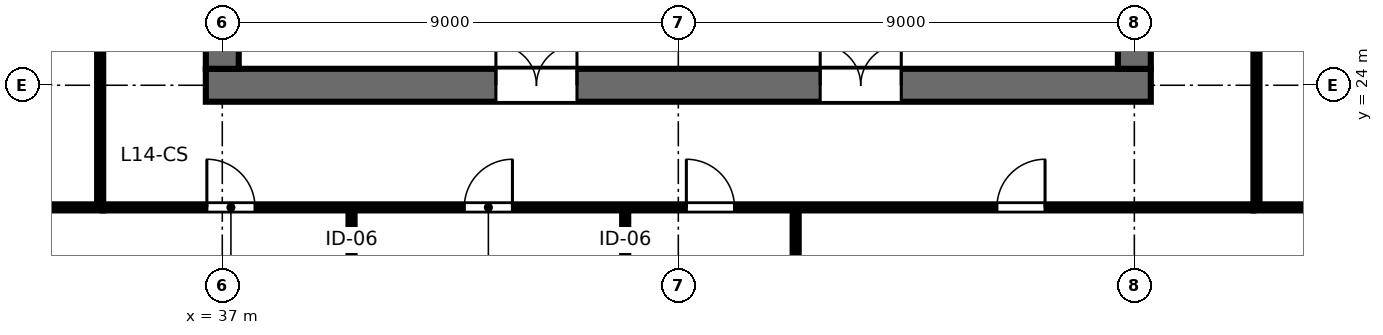
"""IFC4 building model, lengths in metres.
Left out: names, types, materials, properties, quantities, classifications, styles, units other than length and angle.
Written with IfcOpenShell. Run it as: python <this file> out.ifc"""

import sys

from ifc_helpers import new_model, si_unit, direction, frame, frame_2d, origin, place, context, subcontext, project, spatial, rectangle, extrude, element, fill, save


model = new_model("IFC4")
c1 = context("Model", 3, precision=1e-05, world=origin(), true_north=direction((0.0, 1.0)))
c2 = subcontext(c1, "Body", "Model", "MODEL_VIEW")
j1 = project(units=[si_unit("LENGTHUNIT", "METRE"), si_unit("PLANEANGLEUNIT", "RADIAN")], contexts=[c1])
p1 = place(None, origin())
s1 = spatial("IfcSite", under=j1, at=p1, CompositionType="ELEMENT")
p2 = place(p1, origin())
s2 = spatial("IfcBuilding", under=s1, at=p2, CompositionType="ELEMENT")
p3 = place(p2, frame((0.0, 0.0, 56.8)))
s3 = spatial("IfcBuildingStorey", under=s2, at=p3, CompositionType="ELEMENT", Elevation=56.8)
p4 = place(p3, frame((36.675, 24.0, 0.0), z_axis=(0.0, 0.0, 1.0), x_axis=(1.0, 0.0, 0.0)))
e1 = element("IfcWall", 1, at=p4, inside=s3, PredefinedType="SHEAR", context=c2, shape_type="SweptSolid", body=[
    extrude(rectangle(XDim=18.65, YDim=0.65, at=frame_2d((9.325, 0.0))), origin(), (0.0, 0.0, 1.0), 3.36),
])
p5 = place(p4, frame((5.725, 0.0, 0.0)))
e2 = element("IfcOpeningElement", 2, at=p5, cuts=e1, PredefinedType="OPENING", context=c2, shape_type="SweptSolid", body=[
    extrude(rectangle(XDim=1.6, YDim=2.15, at=frame_2d((0.8, 1.075))), frame((0.0, 0.335, 0.0), z_axis=(0.0, -1.0, 0.0), x_axis=(1.0, 0.0, 0.0)), (0.0, 0.0, 1.0), 0.67),
])
p6 = place(p4, frame((12.125, 0.0, 0.0)))
e3 = element("IfcOpeningElement", 3, at=p6, cuts=e1, PredefinedType="OPENING", context=c2, shape_type="SweptSolid", body=[
    extrude(rectangle(XDim=1.6, YDim=2.15, at=frame_2d((0.8, 1.075))), frame((0.0, 0.335, 0.0), z_axis=(0.0, -1.0, 0.0), x_axis=(1.0, 0.0, 0.0)), (0.0, 0.0, 1.0), 0.67),
])
p7 = place(p3, frame((37.0, 24.325, 0.0), z_axis=(0.0, 0.0, 1.0), x_axis=(0.0, 1.0, 0.0)))
e4 = element("IfcWall", 4, at=p7, inside=s3, PredefinedType="SHEAR", context=c2, shape_type="SweptSolid", body=[
    extrude(rectangle(XDim=15.35, YDim=0.65, at=frame_2d((7.675, 0.0))), origin(), (0.0, 0.0, 1.0), 3.36),
])
p8 = place(p7, frame((5.2, 0.0, 0.0)))
e5 = element("IfcOpeningElement", 5, at=p8, cuts=e4, PredefinedType="OPENING", context=c2, shape_type="SweptSolid", body=[
    extrude(rectangle(XDim=1.15, YDim=2.15, at=frame_2d((0.575, 1.075))), frame((0.0, 0.335, 0.0), z_axis=(0.0, -1.0, 0.0), x_axis=(1.0, 0.0, 0.0)), (0.0, 0.0, 1.0), 0.67),
])
p9 = place(p3, frame((55.0, 24.325, 0.0), z_axis=(0.0, 0.0, 1.0), x_axis=(0.0, 1.0, 0.0)))
e6 = element("IfcWall", 6, at=p9, inside=s3, PredefinedType="SHEAR", context=c2, shape_type="SweptSolid", body=[
    extrude(rectangle(XDim=15.35, YDim=0.65, at=frame_2d((7.675, 0.0))), origin(), (0.0, 0.0, 1.0), 3.36),
])
p10 = place(p9, frame((5.2, 0.0, 0.0)))
e7 = element("IfcOpeningElement", 7, at=p10, cuts=e6, PredefinedType="OPENING", context=c2, shape_type="SweptSolid", body=[
    extrude(rectangle(XDim=1.15, YDim=2.15, at=frame_2d((0.575, 1.075))), frame((0.0, 0.335, 0.0), z_axis=(0.0, -1.0, 0.0), x_axis=(1.0, 0.0, 0.0)), (0.0, 0.0, 1.0), 0.67),
])
p11 = place(p3, frame((39.551, 21.59, 0.0), z_axis=(0.0, 0.0, 1.0), x_axis=(0.0, -1.0, 0.0)))
e8 = element("IfcWall", 8, at=p11, inside=s3, PredefinedType="PARTITIONING", context=c2, shape_type="SweptSolid", body=[
    extrude(rectangle(XDim=10.81, YDim=0.12, at=frame_2d((5.405, 0.0))), origin(), (0.0, 0.0, 1.0), 2.64),
])
p12 = place(p11, frame((1.4, 0.0, 0.0)))
e9 = element("IfcOpeningElement", 9, at=p12, cuts=e8, PredefinedType="OPENING", context=c2, shape_type="SweptSolid", body=[
    extrude(rectangle(XDim=0.9, YDim=2.15, at=frame_2d((0.45, 1.075))), frame((0.0, 0.07, 0.0), z_axis=(0.0, -1.0, 0.0), x_axis=(1.0, 0.0, 0.0)), (0.0, 0.0, 1.0), 0.14),
])
p13 = place(p3, frame((44.952, 21.59, 0.0), z_axis=(0.0, 0.0, 1.0), x_axis=(0.0, -1.0, 0.0)))
e10 = element("IfcWall", 10, at=p13, inside=s3, PredefinedType="PARTITIONING", context=c2, shape_type="SweptSolid", body=[
    extrude(rectangle(XDim=10.81, YDim=0.12, at=frame_2d((5.405, 0.0))), origin(), (0.0, 0.0, 1.0), 2.64),
])
p14 = place(p13, frame((1.4, 0.0, 0.0)))
e11 = element("IfcOpeningElement", 11, at=p14, cuts=e10, PredefinedType="OPENING", context=c2, shape_type="SweptSolid", body=[
    extrude(rectangle(XDim=0.9, YDim=2.15, at=frame_2d((0.45, 1.075))), frame((0.0, 0.07, 0.0), z_axis=(0.0, -1.0, 0.0), x_axis=(1.0, 0.0, 0.0)), (0.0, 0.0, 1.0), 0.14),
])
p15 = place(p3, frame((48.316, 21.59, 0.0), z_axis=(0.0, 0.0, 1.0), x_axis=(0.0, -1.0, 0.0)))
e12 = element("IfcWall", 12, at=p15, inside=s3, PredefinedType="PARTITIONING", context=c2, shape_type="SweptSolid", body=[
    extrude(rectangle(XDim=10.81, YDim=0.12, at=frame_2d((5.405, 0.0))), origin(), (0.0, 0.0, 1.0), 2.64),
])
p16 = place(p15, frame((1.4, 0.0, 0.0)))
e13 = element("IfcOpeningElement", 13, at=p16, cuts=e12, PredefinedType="OPENING", context=c2, shape_type="SweptSolid", body=[
    extrude(rectangle(XDim=0.9, YDim=2.15, at=frame_2d((0.45, 1.075))), frame((0.0, 0.07, 0.0), z_axis=(0.0, -1.0, 0.0), x_axis=(1.0, 0.0, 0.0)), (0.0, 0.0, 1.0), 0.14),
])
p17 = place(p3, frame((34.65, 21.59, 0.0), z_axis=(0.0, 0.0, 1.0), x_axis=(1.0, 0.0, 0.0)))
e14 = element("IfcWall", 14, at=p17, inside=s3, PredefinedType="PARTITIONING", context=c2, shape_type="SweptSolid", body=[
    extrude(rectangle(XDim=22.7, YDim=0.12, at=frame_2d((11.35, 0.0))), origin(), (0.0, 0.0, 1.0), 2.64),
])
p18 = place(p17, frame((2.045, 0.0, 0.0)))
e15 = element("IfcOpeningElement", 15, at=p18, cuts=e14, PredefinedType="OPENING", context=c2, shape_type="SweptSolid", body=[
    extrude(rectangle(XDim=0.95, YDim=2.15, at=frame_2d((0.475, 1.075))), frame((0.0, 0.07, 0.0), z_axis=(0.0, -1.0, 0.0), x_axis=(1.0, 0.0, 0.0)), (0.0, 0.0, 1.0), 0.14),
])
p19 = place(p17, frame((7.126, 0.0, 0.0)))
e16 = element("IfcOpeningElement", 16, at=p19, cuts=e14, PredefinedType="OPENING", context=c2, shape_type="SweptSolid", body=[
    extrude(rectangle(XDim=0.95, YDim=2.15, at=frame_2d((0.475, 1.075))), frame((0.0, 0.07, 0.0), z_axis=(0.0, -1.0, 0.0), x_axis=(1.0, 0.0, 0.0)), (0.0, 0.0, 1.0), 0.14),
])
p20 = place(p17, frame((11.509, 0.0, 0.0)))
e17 = element("IfcOpeningElement", 17, at=p20, cuts=e14, PredefinedType="OPENING", context=c2, shape_type="SweptSolid", body=[
    extrude(rectangle(XDim=0.95, YDim=2.15, at=frame_2d((0.475, 1.075))), frame((0.0, 0.07, 0.0), z_axis=(0.0, -1.0, 0.0), x_axis=(1.0, 0.0, 0.0)), (0.0, 0.0, 1.0), 0.14),
])
p21 = place(p17, frame((17.638, 0.0, 0.0)))
e18 = element("IfcOpeningElement", 18, at=p21, cuts=e14, PredefinedType="OPENING", context=c2, shape_type="SweptSolid", body=[
    extrude(rectangle(XDim=0.95, YDim=2.15, at=frame_2d((0.475, 1.075))), frame((0.0, 0.07, 0.0), z_axis=(0.0, -1.0, 0.0), x_axis=(1.0, 0.0, 0.0)), (0.0, 0.0, 1.0), 0.14),
])
p22 = place(p3, frame((34.59, 21.65, 0.0), z_axis=(0.0, 0.0, 1.0), x_axis=(0.0, 1.0, 0.0)))
e19 = element("IfcWall", 19, at=p22, inside=s3, PredefinedType="PARTITIONING", context=c2, shape_type="SweptSolid", body=[
    extrude(rectangle(XDim=20.7, YDim=0.12, at=frame_2d((10.35, 0.0))), origin(), (0.0, 0.0, 1.0), 2.64),
])
p23 = place(p22, frame((9.875, 0.0, 0.0)))
e20 = element("IfcOpeningElement", 20, at=p23, cuts=e19, PredefinedType="OPENING", context=c2, shape_type="SweptSolid", body=[
    extrude(rectangle(XDim=0.95, YDim=2.15, at=frame_2d((0.475, 1.075))), frame((0.0, 0.07, 0.0), z_axis=(0.0, -1.0, 0.0), x_axis=(1.0, 0.0, 0.0)), (0.0, 0.0, 1.0), 0.14),
])
p24 = place(p3, frame((57.41, 21.65, 0.0), z_axis=(0.0, 0.0, 1.0), x_axis=(0.0, 1.0, 0.0)))
e21 = element("IfcWall", 21, at=p24, inside=s3, PredefinedType="PARTITIONING", context=c2, shape_type="SweptSolid", body=[
    extrude(rectangle(XDim=20.7, YDim=0.12, at=frame_2d((10.35, 0.0))), origin(), (0.0, 0.0, 1.0), 2.64),
])
p25 = place(p24, frame((5.479, 0.0, 0.0)))
e22 = element("IfcOpeningElement", 22, at=p25, cuts=e21, PredefinedType="OPENING", context=c2, shape_type="SweptSolid", body=[
    extrude(rectangle(XDim=0.95, YDim=2.15, at=frame_2d((0.475, 1.075))), frame((0.0, 0.07, 0.0), z_axis=(0.0, -1.0, 0.0), x_axis=(1.0, 0.0, 0.0)), (0.0, 0.0, 1.0), 0.14),
])
p26 = place(p24, frame((15.629, 0.0, 0.0)))
e23 = element("IfcOpeningElement", 23, at=p26, cuts=e21, PredefinedType="OPENING", context=c2, shape_type="SweptSolid", body=[
    extrude(rectangle(XDim=0.95, YDim=2.15, at=frame_2d((0.475, 1.075))), frame((0.0, 0.07, 0.0), z_axis=(0.0, -1.0, 0.0), x_axis=(1.0, 0.0, 0.0)), (0.0, 0.0, 1.0), 0.14),
])
for number, where, z_axis, x_axis in (
    (24, (34.65, 21.59, 0.0), (0.0, 0.0, 1.0), (-1.0, 0.0, 0.0)),
    (25, (57.35, 21.59, 0.0), (0.0, 0.0, 1.0), (1.0, 0.0, 0.0)),
):
    element("IfcWall", number, at=place(p3, frame(where, z_axis=z_axis, x_axis=x_axis)), inside=s3, PredefinedType="PARTITIONING", context=c2, shape_type="SweptSolid", body=[
        extrude(rectangle(XDim=12.77, YDim=0.12, at=frame_2d((6.385, 0.0))), origin(), (0.0, 0.0, 1.0), 2.64),
    ])
p27 = place(p5, origin())
e26 = element("IfcDoor", 26, at=p27, inside=s3, OperationType="DOUBLE_DOOR_SINGLE_SWING", PredefinedType="DOOR", context=c2, shape_type="SweptSolid", body=[
    extrude(rectangle(XDim=1.6, YDim=2.15, at=frame_2d((0.8, 1.075))), frame((0.0, 0.025, 0.0), z_axis=(0.0, -1.0, 0.0), x_axis=(1.0, 0.0, 0.0)), (0.0, 0.0, 1.0), 0.05),
])
fill(e2, e26)
p28 = place(p6, origin())
e27 = element("IfcDoor", 27, at=p28, inside=s3, OperationType="DOUBLE_DOOR_SINGLE_SWING", PredefinedType="DOOR", context=c2, shape_type="SweptSolid", body=[
    extrude(rectangle(XDim=1.6, YDim=2.15, at=frame_2d((0.8, 1.075))), frame((0.0, 0.025, 0.0), z_axis=(0.0, -1.0, 0.0), x_axis=(1.0, 0.0, 0.0)), (0.0, 0.0, 1.0), 0.05),
])
fill(e3, e27)
p29 = place(p18, origin())
e28 = element("IfcDoor", 28, at=p29, inside=s3, OperationType="SINGLE_SWING_LEFT", PredefinedType="DOOR", context=c2, shape_type="SweptSolid", body=[
    extrude(rectangle(XDim=0.95, YDim=2.15, at=frame_2d((0.475, 1.075))), frame((0.0, 0.025, 0.0), z_axis=(0.0, -1.0, 0.0), x_axis=(1.0, 0.0, 0.0)), (0.0, 0.0, 1.0), 0.05),
])
fill(e15, e28)
p30 = place(p19, origin())
e29 = element("IfcDoor", 29, at=p30, inside=s3, OperationType="SINGLE_SWING_RIGHT", PredefinedType="DOOR", context=c2, shape_type="SweptSolid", body=[
    extrude(rectangle(XDim=0.95, YDim=2.15, at=frame_2d((0.475, 1.075))), frame((0.0, 0.025, 0.0), z_axis=(0.0, -1.0, 0.0), x_axis=(1.0, 0.0, 0.0)), (0.0, 0.0, 1.0), 0.05),
])
fill(e16, e29)
p31 = place(p20, origin())
e30 = element("IfcDoor", 30, at=p31, inside=s3, OperationType="SINGLE_SWING_LEFT", PredefinedType="DOOR", context=c2, shape_type="SweptSolid", body=[
    extrude(rectangle(XDim=0.95, YDim=2.15, at=frame_2d((0.475, 1.075))), frame((0.0, 0.025, 0.0), z_axis=(0.0, -1.0, 0.0), x_axis=(1.0, 0.0, 0.0)), (0.0, 0.0, 1.0), 0.05),
])
fill(e17, e30)
p32 = place(p21, origin())
e31 = element("IfcDoor", 31, at=p32, inside=s3, OperationType="SINGLE_SWING_RIGHT", PredefinedType="DOOR", context=c2, shape_type="SweptSolid", body=[
    extrude(rectangle(XDim=0.95, YDim=2.15, at=frame_2d((0.475, 1.075))), frame((0.0, 0.025, 0.0), z_axis=(0.0, -1.0, 0.0), x_axis=(1.0, 0.0, 0.0)), (0.0, 0.0, 1.0), 0.05),
])
fill(e18, e31)
save(model, sys.argv[1])
